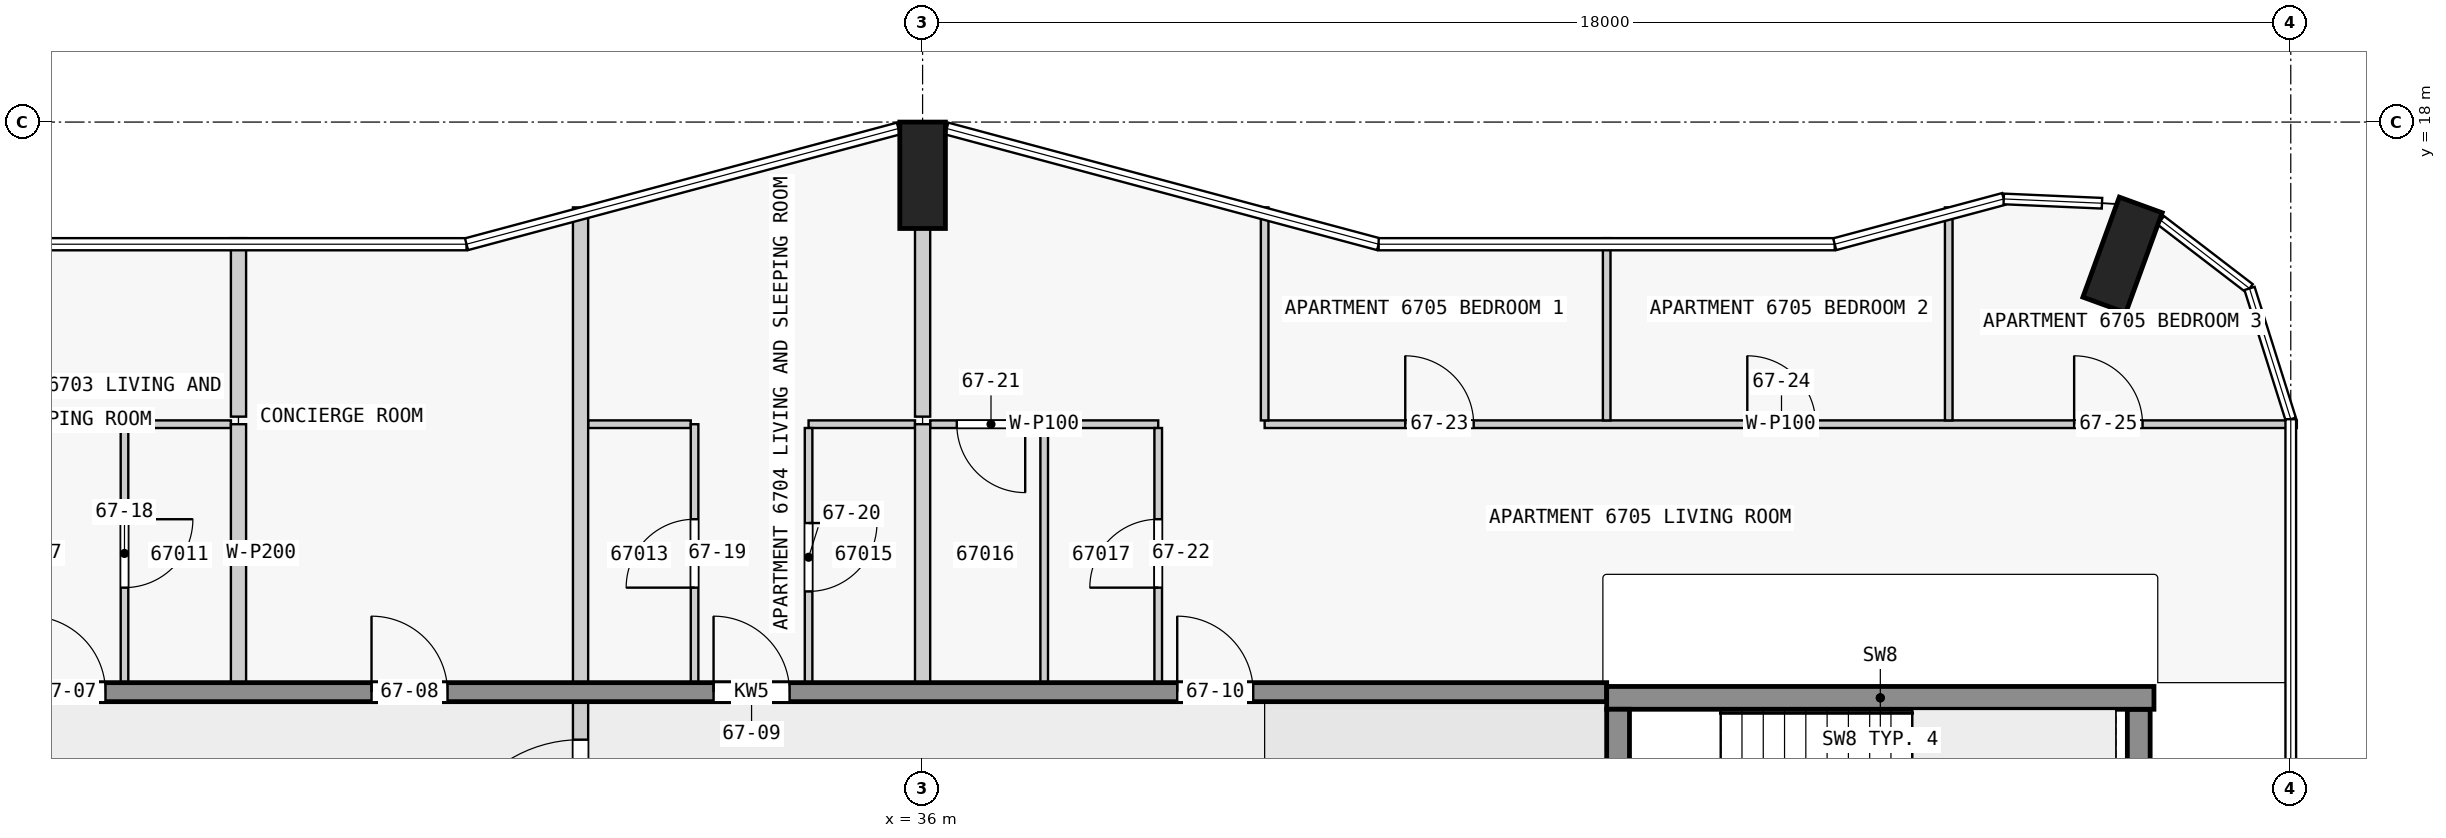
"""IFC4 building model, lengths in metres.
Left out: names, types, materials, properties, quantities, classifications, styles, units other than length and angle.
Written with IfcOpenShell. Run it as: python <this file> out.ifc"""

import sys

from ifc_helpers import new_model, si_unit, direction, frame, frame_2d, origin, origin_2d, place, context, subcontext, project, spatial, rectangle, extrude, element, fill, save


model = new_model("IFC4")
c1 = context("Model", 3, precision=1e-05, world=origin(), true_north=direction((0.0, 1.0)))
c2 = subcontext(c1, "Body", "Model", "MODEL_VIEW")
j1 = project(units=[si_unit("LENGTHUNIT", "METRE"), si_unit("PLANEANGLEUNIT", "RADIAN")], contexts=[c1])
p1 = place(None, origin())
s1 = spatial("IfcSite", under=j1, at=p1, CompositionType="ELEMENT")
p2 = place(p1, origin())
s2 = spatial("IfcBuilding", under=s1, at=p2, CompositionType="ELEMENT")
p3 = place(p2, frame((0.0, 0.0, 256.4)))
s3 = spatial("IfcBuildingStorey", under=s2, at=p3, CompositionType="ELEMENT", Elevation=256.4)
for number, where, z_axis, x_axis in (
    (1, (51.787, 16.252, 0.0), (0.0, 0.0, 1.0), (-0.94, 0.342, 0.0)),
    (2, (36.0, 17.3, 0.0), (0.0, 0.0, 1.0), (1.0, 0.0, 0.0)),
):
    element("IfcColumn", number, at=place(p3, frame(where, z_axis=z_axis, x_axis=x_axis)), inside=s3, PredefinedType="COLUMN", context=c2, shape_type="SweptSolid", body=[
        extrude(rectangle(XDim=0.6, YDim=1.4, at=origin_2d()), origin(), (0.0, 0.0, 1.0), 3.5),
    ])
p4 = place(p3, frame((45.15, 7.725, 0.0), z_axis=(0.0, 0.0, 1.0), x_axis=(0.0, 1.0, 0.0)))
e3 = element("IfcWall", 3, at=p4, inside=s3, PredefinedType="SHEAR", context=c2, shape_type="SweptSolid", body=[
    extrude(rectangle(XDim=2.55, YDim=0.3, at=frame_2d((1.275, 0.0))), origin(), (0.0, 0.0, 1.0), 3.5),
])
p5 = place(p4, frame((0.725, 0.0, 0.0)))
e4 = element("IfcOpeningElement", 4, at=p5, cuts=e3, PredefinedType="OPENING", context=c2, shape_type="SweptSolid", body=[
    extrude(rectangle(XDim=1.1, YDim=2.1, at=frame_2d((0.55, 1.05))), frame((0.0, 0.16, 0.0), z_axis=(0.0, -1.0, 0.0), x_axis=(1.0, 0.0, 0.0)), (0.0, 0.0, 1.0), 0.32),
])
p6 = place(p3, frame((52.0, 7.725, 0.0), z_axis=(0.0, 0.0, 1.0), x_axis=(0.0, 1.0, 0.0)))
e5 = element("IfcWall", 5, at=p6, inside=s3, PredefinedType="SHEAR", context=c2, shape_type="SweptSolid", body=[
    extrude(rectangle(XDim=2.55, YDim=0.3, at=frame_2d((1.275, 0.0))), origin(), (0.0, 0.0, 1.0), 3.5),
])
p7 = place(p3, frame((45.0, 10.425, 0.0), z_axis=(0.0, 0.0, 1.0), x_axis=(1.0, 0.0, 0.0)))
e6 = element("IfcWall", 6, at=p7, inside=s3, PredefinedType="SHEAR", context=c2, shape_type="SweptSolid", body=[
    extrude(rectangle(XDim=7.2, YDim=0.3, at=frame_2d((3.6, 0.0))), origin(), (0.0, 0.0, 1.0), 3.5),
])
p8 = place(p3, frame((22.5, 10.5, 0.0), z_axis=(0.0, 0.0, 1.0), x_axis=(1.0, 0.0, 0.0)))
e7 = element("IfcWall", 7, at=p8, inside=s3, PredefinedType="SHEAR", context=c2, shape_type="SweptSolid", body=[
    extrude(rectangle(XDim=22.5, YDim=0.25, at=frame_2d((11.25, 0.0))), origin(), (0.0, 0.0, 1.0), 3.25),
])
p9 = place(p8, frame((1.75, 0.0, 0.0)))
e8 = element("IfcOpeningElement", 8, at=p9, cuts=e7, PredefinedType="OPENING", context=c2, shape_type="SweptSolid", body=[
    extrude(rectangle(XDim=1.0, YDim=2.1, at=frame_2d((0.5, 1.05))), frame((0.0, 0.135, 0.0), z_axis=(0.0, -1.0, 0.0), x_axis=(1.0, 0.0, 0.0)), (0.0, 0.0, 1.0), 0.27),
])
p10 = place(p8, frame((6.25, 0.0, 0.0)))
e9 = element("IfcOpeningElement", 9, at=p10, cuts=e7, PredefinedType="OPENING", context=c2, shape_type="SweptSolid", body=[
    extrude(rectangle(XDim=1.0, YDim=2.1, at=frame_2d((0.5, 1.05))), frame((0.0, 0.135, 0.0), z_axis=(0.0, -1.0, 0.0), x_axis=(1.0, 0.0, 0.0)), (0.0, 0.0, 1.0), 0.27),
])
p11 = place(p8, frame((10.75, 0.0, 0.0)))
e10 = element("IfcOpeningElement", 10, at=p11, cuts=e7, PredefinedType="OPENING", context=c2, shape_type="SweptSolid", body=[
    extrude(rectangle(XDim=1.0, YDim=2.1, at=frame_2d((0.5, 1.05))), frame((0.0, 0.135, 0.0), z_axis=(0.0, -1.0, 0.0), x_axis=(1.0, 0.0, 0.0)), (0.0, 0.0, 1.0), 0.27),
])
p12 = place(p8, frame((16.85, 0.0, 0.0)))
e11 = element("IfcOpeningElement", 11, at=p12, cuts=e7, PredefinedType="OPENING", context=c2, shape_type="SweptSolid", body=[
    extrude(rectangle(XDim=1.0, YDim=2.1, at=frame_2d((0.5, 1.05))), frame((0.0, 0.135, 0.0), z_axis=(0.0, -1.0, 0.0), x_axis=(1.0, 0.0, 0.0)), (0.0, 0.0, 1.0), 0.27),
])
for number, where, z_axis, x_axis in (
    (12, (26.9, 14.025, 0.0), (0.0, 0.0, 1.0), (-1.0, 0.0, 0.0)),
    (13, (32.95, 14.025, 0.0), (0.0, 0.0, 1.0), (-1.0, 0.0, 0.0)),
):
    element("IfcWall", number, at=place(p3, frame(where, z_axis=z_axis, x_axis=x_axis)), inside=s3, PredefinedType="PARTITIONING", context=c2, shape_type="SweptSolid", body=[
        extrude(rectangle(XDim=1.35, YDim=0.1, at=frame_2d((0.675, 0.0))), origin(), (0.0, 0.0, 1.0), 3.25),
    ])
p13 = place(p3, frame((35.9, 14.025, 0.0), z_axis=(0.0, 0.0, 1.0), x_axis=(-1.0, 0.0, 0.0)))
e14 = element("IfcWall", 14, at=p13, inside=s3, PredefinedType="PARTITIONING", context=c2, shape_type="SweptSolid", body=[
    extrude(rectangle(XDim=1.4, YDim=0.1, at=frame_2d((0.7, 0.0))), origin(), (0.0, 0.0, 1.0), 3.25),
])
p14 = place(p3, frame((39.1, 14.025, 0.0), z_axis=(0.0, 0.0, 1.0), x_axis=(-1.0, 0.0, 0.0)))
e15 = element("IfcWall", 15, at=p14, inside=s3, PredefinedType="PARTITIONING", context=c2, shape_type="SweptSolid", body=[
    extrude(rectangle(XDim=3.0, YDim=0.1, at=frame_2d((1.5, 0.0))), origin(), (0.0, 0.0, 1.0), 3.25),
])
p15 = place(p14, frame((1.75, 0.0, 0.0)))
e16 = element("IfcOpeningElement", 16, at=p15, cuts=e15, PredefinedType="OPENING", context=c2, shape_type="SweptSolid", body=[
    extrude(rectangle(XDim=0.9, YDim=2.1, at=frame_2d((0.45, 1.05))), frame((0.0, 0.06, 0.0), z_axis=(0.0, -1.0, 0.0), x_axis=(1.0, 0.0, 0.0)), (0.0, 0.0, 1.0), 0.12),
])
p16 = place(p3, frame((40.5, 14.025, 0.0), z_axis=(0.0, 0.0, 1.0), x_axis=(1.0, 0.0, 0.0)))
e17 = element("IfcWall", 17, at=p16, inside=s3, PredefinedType="PARTITIONING", context=c2, shape_type="SweptSolid", body=[
    extrude(rectangle(XDim=13.58, YDim=0.1, at=frame_2d((6.79, 0.0))), origin(), (0.0, 0.0, 1.0), 3.25),
])
p17 = place(p16, frame((1.85, 0.0, 0.0)))
e18 = element("IfcOpeningElement", 18, at=p17, cuts=e17, PredefinedType="OPENING", context=c2, shape_type="SweptSolid", body=[
    extrude(rectangle(XDim=0.9, YDim=2.1, at=frame_2d((0.45, 1.05))), frame((0.0, 0.06, 0.0), z_axis=(0.0, -1.0, 0.0), x_axis=(1.0, 0.0, 0.0)), (0.0, 0.0, 1.0), 0.12),
])
p18 = place(p16, frame((6.35, 0.0, 0.0)))
e19 = element("IfcOpeningElement", 19, at=p18, cuts=e17, PredefinedType="OPENING", context=c2, shape_type="SweptSolid", body=[
    extrude(rectangle(XDim=0.9, YDim=2.1, at=frame_2d((0.45, 1.05))), frame((0.0, 0.06, 0.0), z_axis=(0.0, -1.0, 0.0), x_axis=(1.0, 0.0, 0.0)), (0.0, 0.0, 1.0), 0.12),
])
p19 = place(p16, frame((10.65, 0.0, 0.0)))
e20 = element("IfcOpeningElement", 20, at=p19, cuts=e17, PredefinedType="OPENING", context=c2, shape_type="SweptSolid", body=[
    extrude(rectangle(XDim=0.9, YDim=2.1, at=frame_2d((0.45, 1.05))), frame((0.0, 0.06, 0.0), z_axis=(0.0, -1.0, 0.0), x_axis=(1.0, 0.0, 0.0)), (0.0, 0.0, 1.0), 0.12),
])
p20 = place(p3, frame((25.5, 14.025, 0.0), z_axis=(0.0, 0.0, 1.0), x_axis=(0.0, -1.0, 0.0)))
e21 = element("IfcWall", 21, at=p20, inside=s3, PredefinedType="PARTITIONING", context=c2, shape_type="SweptSolid", body=[
    extrude(rectangle(XDim=3.4, YDim=0.1, at=frame_2d((1.7, 0.0))), origin(), (0.0, 0.0, 1.0), 3.25),
])
p21 = place(p20, frame((1.25, 0.0, 0.0)))
e22 = element("IfcOpeningElement", 22, at=p21, cuts=e21, PredefinedType="OPENING", context=c2, shape_type="SweptSolid", body=[
    extrude(rectangle(XDim=0.9, YDim=2.1, at=frame_2d((0.45, 1.05))), frame((0.0, 0.06, 0.0), z_axis=(0.0, -1.0, 0.0), x_axis=(1.0, 0.0, 0.0)), (0.0, 0.0, 1.0), 0.12),
])
p22 = place(p3, frame((27.0, 16.473, 0.0), z_axis=(0.0, 0.0, 1.0), x_axis=(0.0, -1.0, 0.0)))
e23 = element("IfcWall", 23, at=p22, inside=s3, PredefinedType="PARTITIONING", context=c2, shape_type="SweptSolid", body=[
    extrude(rectangle(XDim=2.348, YDim=0.2, at=frame_2d((1.174, 0.0))), origin(), (0.0, 0.0, 1.0), 3.25),
])
p23 = place(p3, frame((27.0, 10.625, 0.0), z_axis=(0.0, 0.0, 1.0), x_axis=(0.0, 1.0, 0.0)))
e24 = element("IfcWall", 24, at=p23, inside=s3, PredefinedType="PARTITIONING", context=c2, shape_type="SweptSolid", body=[
    extrude(rectangle(XDim=3.4, YDim=0.2, at=frame_2d((1.7, 0.0))), origin(), (0.0, 0.0, 1.0), 3.25),
])
p24 = place(p3, frame((31.5, 10.625, 0.0), z_axis=(0.0, 0.0, 1.0), x_axis=(0.0, 1.0, 0.0)))
e25 = element("IfcWall", 25, at=p24, inside=s3, PredefinedType="PARTITIONING", context=c2, shape_type="SweptSolid", body=[
    extrude(rectangle(XDim=6.253, YDim=0.2, at=frame_2d((3.126, 0.0))), origin(), (0.0, 0.0, 1.0), 3.25),
])
p25 = place(p3, frame((33.0, 10.625, 0.0), z_axis=(0.0, 0.0, 1.0), x_axis=(0.0, 1.0, 0.0)))
e26 = element("IfcWall", 26, at=p25, inside=s3, PredefinedType="PARTITIONING", context=c2, shape_type="SweptSolid", body=[
    extrude(rectangle(XDim=3.4, YDim=0.1, at=frame_2d((1.7, 0.0))), origin(), (0.0, 0.0, 1.0), 3.25),
])
p26 = place(p25, frame((1.25, 0.0, 0.0)))
e27 = element("IfcOpeningElement", 27, at=p26, cuts=e26, PredefinedType="OPENING", context=c2, shape_type="SweptSolid", body=[
    extrude(rectangle(XDim=0.9, YDim=2.1, at=frame_2d((0.45, 1.05))), frame((0.0, 0.06, 0.0), z_axis=(0.0, -1.0, 0.0), x_axis=(1.0, 0.0, 0.0)), (0.0, 0.0, 1.0), 0.12),
])
p27 = place(p3, frame((34.5, 13.975, 0.0), z_axis=(0.0, 0.0, 1.0), x_axis=(0.0, -1.0, 0.0)))
e28 = element("IfcWall", 28, at=p27, inside=s3, PredefinedType="PARTITIONING", context=c2, shape_type="SweptSolid", body=[
    extrude(rectangle(XDim=3.35, YDim=0.1, at=frame_2d((1.675, 0.0))), origin(), (0.0, 0.0, 1.0), 3.25),
])
p28 = place(p27, frame((1.25, 0.0, 0.0)))
e29 = element("IfcOpeningElement", 29, at=p28, cuts=e28, PredefinedType="OPENING", context=c2, shape_type="SweptSolid", body=[
    extrude(rectangle(XDim=0.9, YDim=2.1, at=frame_2d((0.45, 1.05))), frame((0.0, 0.06, 0.0), z_axis=(0.0, -1.0, 0.0), x_axis=(1.0, 0.0, 0.0)), (0.0, 0.0, 1.0), 0.12),
])
p29 = place(p3, frame((36.0, 16.6, 0.0), z_axis=(0.0, 0.0, 1.0), x_axis=(0.0, -1.0, 0.0)))
e30 = element("IfcWall", 30, at=p29, inside=s3, PredefinedType="PARTITIONING", context=c2, shape_type="SweptSolid", body=[
    extrude(rectangle(XDim=2.475, YDim=0.2, at=frame_2d((1.238, 0.0))), origin(), (0.0, 0.0, 1.0), 3.25),
])
p30 = place(p3, frame((36.0, 10.625, 0.0), z_axis=(0.0, 0.0, 1.0), x_axis=(0.0, 1.0, 0.0)))
e31 = element("IfcWall", 31, at=p30, inside=s3, PredefinedType="PARTITIONING", context=c2, shape_type="SweptSolid", body=[
    extrude(rectangle(XDim=3.4, YDim=0.2, at=frame_2d((1.7, 0.0))), origin(), (0.0, 0.0, 1.0), 3.25),
])
p31 = place(p3, frame((37.6, 10.625, 0.0), z_axis=(0.0, 0.0, 1.0), x_axis=(0.0, 1.0, 0.0)))
e32 = element("IfcWall", 32, at=p31, inside=s3, PredefinedType="PARTITIONING", context=c2, shape_type="SweptSolid", body=[
    extrude(rectangle(XDim=3.35, YDim=0.1, at=frame_2d((1.675, 0.0))), origin(), (0.0, 0.0, 1.0), 3.25),
])
p32 = place(p3, frame((39.1, 10.625, 0.0), z_axis=(0.0, 0.0, 1.0), x_axis=(0.0, 1.0, 0.0)))
e33 = element("IfcWall", 33, at=p32, inside=s3, PredefinedType="PARTITIONING", context=c2, shape_type="SweptSolid", body=[
    extrude(rectangle(XDim=3.35, YDim=0.1, at=frame_2d((1.675, 0.0))), origin(), (0.0, 0.0, 1.0), 3.25),
])
p33 = place(p32, frame((1.25, 0.0, 0.0)))
e34 = element("IfcOpeningElement", 34, at=p33, cuts=e33, PredefinedType="OPENING", context=c2, shape_type="SweptSolid", body=[
    extrude(rectangle(XDim=0.9, YDim=2.1, at=frame_2d((0.45, 1.05))), frame((0.0, 0.06, 0.0), z_axis=(0.0, -1.0, 0.0), x_axis=(1.0, 0.0, 0.0)), (0.0, 0.0, 1.0), 0.12),
])
p34 = place(p3, frame((40.5, 16.878, 0.0), z_axis=(0.0, 0.0, 1.0), x_axis=(0.0, -1.0, 0.0)))
e35 = element("IfcWall", 35, at=p34, inside=s3, PredefinedType="PARTITIONING", context=c2, shape_type="SweptSolid", body=[
    extrude(rectangle(XDim=2.803, YDim=0.1, at=frame_2d((1.401, 0.0))), origin(), (0.0, 0.0, 1.0), 3.25),
])
p35 = place(p3, frame((45.0, 14.075, 0.0), z_axis=(0.0, 0.0, 1.0), x_axis=(0.0, 1.0, 0.0)))
e36 = element("IfcWall", 36, at=p35, inside=s3, PredefinedType="PARTITIONING", context=c2, shape_type="SweptSolid", body=[
    extrude(rectangle(XDim=2.398, YDim=0.1, at=frame_2d((1.199, 0.0))), origin(), (0.0, 0.0, 1.0), 3.25),
])
p36 = place(p3, frame((49.5, 14.075, 0.0), z_axis=(0.0, 0.0, 1.0), x_axis=(0.0, 1.0, 0.0)))
e37 = element("IfcWall", 37, at=p36, inside=s3, PredefinedType="PARTITIONING", context=c2, shape_type="SweptSolid", body=[
    extrude(rectangle(XDim=2.803, YDim=0.1, at=frame_2d((1.401, 0.0))), origin(), (0.0, 0.0, 1.0), 3.25),
])
p37 = place(p3, frame((31.5, 7.475, 0.0), z_axis=(0.0, 0.0, 1.0), x_axis=(0.0, 1.0, 0.0)))
e38 = element("IfcWall", 38, at=p37, inside=s3, PredefinedType="PARTITIONING", context=c2, shape_type="SweptSolid", body=[
    extrude(rectangle(XDim=3.05, YDim=0.2, at=frame_2d((1.525, 0.0))), origin(), (0.0, 0.0, 1.0), 3.25),
])
p38 = place(p37, frame((0.6, 0.0, 0.0)))
e39 = element("IfcOpeningElement", 39, at=p38, cuts=e38, PredefinedType="OPENING", context=c2, shape_type="SweptSolid", body=[
    extrude(rectangle(XDim=1.8, YDim=2.1, at=frame_2d((0.9, 1.05))), frame((0.0, 0.11, 0.0), z_axis=(0.0, -1.0, 0.0), x_axis=(1.0, 0.0, 0.0)), (0.0, 0.0, 1.0), 0.22),
])
p39 = place(p9, origin())
e40 = element("IfcDoor", 40, at=p39, inside=s3, OperationType="SINGLE_SWING_LEFT", PredefinedType="DOOR", context=c2, shape_type="SweptSolid", body=[
    extrude(rectangle(XDim=1.0, YDim=2.1, at=frame_2d((0.5, 1.05))), frame((0.0, 0.025, 0.0), z_axis=(0.0, -1.0, 0.0), x_axis=(1.0, 0.0, 0.0)), (0.0, 0.0, 1.0), 0.05),
])
fill(e8, e40)
p40 = place(p10, origin())
e41 = element("IfcDoor", 41, at=p40, inside=s3, OperationType="SINGLE_SWING_LEFT", PredefinedType="DOOR", context=c2, shape_type="SweptSolid", body=[
    extrude(rectangle(XDim=1.0, YDim=2.1, at=frame_2d((0.5, 1.05))), frame((0.0, 0.025, 0.0), z_axis=(0.0, -1.0, 0.0), x_axis=(1.0, 0.0, 0.0)), (0.0, 0.0, 1.0), 0.05),
])
fill(e9, e41)
p41 = place(p11, origin())
e42 = element("IfcDoor", 42, at=p41, inside=s3, OperationType="SINGLE_SWING_LEFT", PredefinedType="DOOR", context=c2, shape_type="SweptSolid", body=[
    extrude(rectangle(XDim=1.0, YDim=2.1, at=frame_2d((0.5, 1.05))), frame((0.0, 0.025, 0.0), z_axis=(0.0, -1.0, 0.0), x_axis=(1.0, 0.0, 0.0)), (0.0, 0.0, 1.0), 0.05),
])
fill(e10, e42)
p42 = place(p12, origin())
e43 = element("IfcDoor", 43, at=p42, inside=s3, OperationType="SINGLE_SWING_RIGHT", PredefinedType="DOOR", context=c2, shape_type="SweptSolid", body=[
    extrude(rectangle(XDim=1.0, YDim=2.1, at=frame_2d((0.5, 1.05))), frame((0.0, 0.025, 0.0), z_axis=(0.0, -1.0, 0.0), x_axis=(1.0, 0.0, 0.0)), (0.0, 0.0, 1.0), 0.05),
])
fill(e11, e43)
p43 = place(p38, origin())
e44 = element("IfcDoor", 44, at=p43, inside=s3, OperationType="SINGLE_SWING_LEFT", PredefinedType="DOOR", context=c2, shape_type="SweptSolid", body=[
    extrude(rectangle(XDim=1.8, YDim=2.1, at=frame_2d((0.9, 1.05))), frame((0.0, 0.025, 0.0), z_axis=(0.0, -1.0, 0.0), x_axis=(1.0, 0.0, 0.0)), (0.0, 0.0, 1.0), 0.05),
])
fill(e39, e44)
p44 = place(p21, origin())
e45 = element("IfcDoor", 45, at=p44, inside=s3, OperationType="SINGLE_SWING_LEFT", PredefinedType="DOOR", context=c2, shape_type="SweptSolid", body=[
    extrude(rectangle(XDim=0.9, YDim=2.1, at=frame_2d((0.45, 1.05))), frame((0.0, 0.025, 0.0), z_axis=(0.0, -1.0, 0.0), x_axis=(1.0, 0.0, 0.0)), (0.0, 0.0, 1.0), 0.05),
])
fill(e22, e45)
p45 = place(p26, origin())
e46 = element("IfcDoor", 46, at=p45, inside=s3, OperationType="SINGLE_SWING_LEFT", PredefinedType="DOOR", context=c2, shape_type="SweptSolid", body=[
    extrude(rectangle(XDim=0.9, YDim=2.1, at=frame_2d((0.45, 1.05))), frame((0.0, 0.025, 0.0), z_axis=(0.0, -1.0, 0.0), x_axis=(1.0, 0.0, 0.0)), (0.0, 0.0, 1.0), 0.05),
])
fill(e27, e46)
p46 = place(p28, origin())
e47 = element("IfcDoor", 47, at=p46, inside=s3, OperationType="SINGLE_SWING_RIGHT", PredefinedType="DOOR", context=c2, shape_type="SweptSolid", body=[
    extrude(rectangle(XDim=0.9, YDim=2.1, at=frame_2d((0.45, 1.05))), frame((0.0, 0.025, 0.0), z_axis=(0.0, -1.0, 0.0), x_axis=(1.0, 0.0, 0.0)), (0.0, 0.0, 1.0), 0.05),
])
fill(e29, e47)
p47 = place(p15, origin())
e48 = element("IfcDoor", 48, at=p47, inside=s3, OperationType="SINGLE_SWING_RIGHT", PredefinedType="DOOR", context=c2, shape_type="SweptSolid", body=[
    extrude(rectangle(XDim=0.9, YDim=2.1, at=frame_2d((0.45, 1.05))), frame((0.0, 0.025, 0.0), z_axis=(0.0, -1.0, 0.0), x_axis=(1.0, 0.0, 0.0)), (0.0, 0.0, 1.0), 0.05),
])
fill(e16, e48)
p48 = place(p33, origin())
e49 = element("IfcDoor", 49, at=p48, inside=s3, OperationType="SINGLE_SWING_RIGHT", PredefinedType="DOOR", context=c2, shape_type="SweptSolid", body=[
    extrude(rectangle(XDim=0.9, YDim=2.1, at=frame_2d((0.45, 1.05))), frame((0.0, 0.025, 0.0), z_axis=(0.0, -1.0, 0.0), x_axis=(1.0, 0.0, 0.0)), (0.0, 0.0, 1.0), 0.05),
])
fill(e34, e49)
p49 = place(p17, origin())
e50 = element("IfcDoor", 50, at=p49, inside=s3, OperationType="SINGLE_SWING_LEFT", PredefinedType="DOOR", context=c2, shape_type="SweptSolid", body=[
    extrude(rectangle(XDim=0.9, YDim=2.1, at=frame_2d((0.45, 1.05))), frame((0.0, 0.025, 0.0), z_axis=(0.0, -1.0, 0.0), x_axis=(1.0, 0.0, 0.0)), (0.0, 0.0, 1.0), 0.05),
])
fill(e18, e50)
p50 = place(p18, origin())
e51 = element("IfcDoor", 51, at=p50, inside=s3, OperationType="SINGLE_SWING_RIGHT", PredefinedType="DOOR", context=c2, shape_type="SweptSolid", body=[
    extrude(rectangle(XDim=0.9, YDim=2.1, at=frame_2d((0.45, 1.05))), frame((0.0, 0.025, 0.0), z_axis=(0.0, -1.0, 0.0), x_axis=(1.0, 0.0, 0.0)), (0.0, 0.0, 1.0), 0.05),
])
fill(e19, e51)
p51 = place(p19, origin())
e52 = element("IfcDoor", 52, at=p51, inside=s3, OperationType="SINGLE_SWING_RIGHT", PredefinedType="DOOR", context=c2, shape_type="SweptSolid", body=[
    extrude(rectangle(XDim=0.9, YDim=2.1, at=frame_2d((0.45, 1.05))), frame((0.0, 0.025, 0.0), z_axis=(0.0, -1.0, 0.0), x_axis=(1.0, 0.0, 0.0)), (0.0, 0.0, 1.0), 0.05),
])
fill(e20, e52)
save(model, sys.argv[1])
